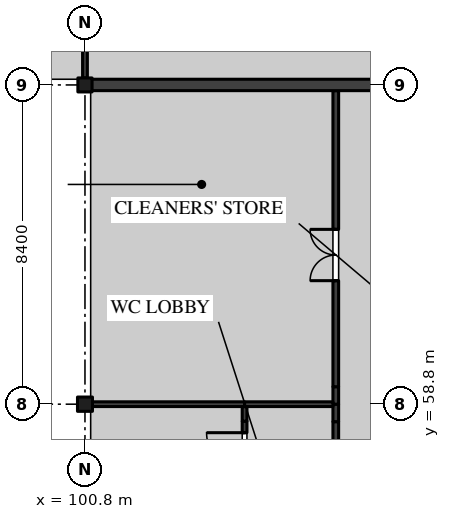
"""IFC4 building model, lengths in metres.
Left out: names, types, materials, properties, quantities, classifications, styles, units other than length and angle.
Written with IfcOpenShell. Run it as: python <this file> out.ifc"""

import sys

from ifc_helpers import new_model, si_unit, direction, frame, frame_2d, origin, origin_2d, place, context, subcontext, project, spatial, rectangle, i_section, extrude, element, fill, save


model = new_model("IFC4")
c1 = context("Model", 3, precision=1e-05, world=origin(), true_north=direction((0.0, 1.0)))
c2 = subcontext(c1, "Body", "Model", "MODEL_VIEW")
j1 = project(units=[si_unit("LENGTHUNIT", "METRE"), si_unit("PLANEANGLEUNIT", "RADIAN")], contexts=[c1])
p1 = place(None, origin())
s1 = spatial("IfcSite", under=j1, at=p1, CompositionType="ELEMENT")
p2 = place(p1, origin())
s2 = spatial("IfcBuilding", under=s1, at=p2, CompositionType="ELEMENT")
p3 = place(p2, frame((0.0, 0.0, 18.9)))
s3 = spatial("IfcBuildingStorey", under=s2, at=p3, CompositionType="ELEMENT", Elevation=18.9)
p4 = place(p3, frame((100.8, 58.8, 0.0), z_axis=(0.0, 0.0, 1.0), x_axis=(1.0, 0.0, 0.0)))
e1 = element("IfcColumn", 1, at=p4, inside=s3, PredefinedType="COLUMN", context=c2, shape_type="SweptSolid", body=[
    extrude(i_section(OverallWidth=0.394, OverallDepth=0.376, WebThickness=0.017, FlangeThickness=0.028, FilletRadius=0.015, at=origin_2d()), origin(), (0.0, 0.0, 1.0), 4.37),
])
p5 = place(p3, frame((100.8, 67.2, 0.0), z_axis=(0.0, 0.0, 1.0), x_axis=(1.0, 0.0, 0.0)))
e2 = element("IfcColumn", 2, at=p5, inside=s3, PredefinedType="COLUMN", context=c2, shape_type="SweptSolid", body=[
    extrude(i_section(OverallWidth=0.373, OverallDepth=0.368, WebThickness=0.015, FlangeThickness=0.024, FilletRadius=0.015, at=origin_2d()), origin(), (0.0, 0.0, 1.0), 4.37),
])
p6 = place(p3, frame((107.4, 50.86, 0.0), z_axis=(0.0, 0.0, 1.0), x_axis=(0.0, 1.0, 0.0)))
e3 = element("IfcWall", 3, at=p6, inside=s3, PredefinedType="PARTITIONING", context=c2, shape_type="SweptSolid", body=[
    extrude(rectangle(XDim=7.48, YDim=0.15, at=frame_2d((3.74, 0.0))), origin(), (0.0, 0.0, 1.0), 4.37),
])
p7 = place(p6, frame((2.09, 0.0, 0.0)))
e4 = element("IfcOpeningElement", 4, at=p7, cuts=e3, PredefinedType="OPENING", context=c2, shape_type="SweptSolid", body=[
    extrude(rectangle(XDim=0.9, YDim=2.1, at=frame_2d((0.45, 1.05))), frame((0.0, 0.085, 0.0), z_axis=(0.0, -1.0, 0.0), x_axis=(1.0, 0.0, 0.0)), (0.0, 0.0, 1.0), 0.17),
])
for number, where, z_axis, x_axis in (
    (5, (107.4, 58.34, 0.0), (0.0, 0.0, 1.0), (0.0, 1.0, 0.0)),
    (6, (107.4, 58.8, 0.0), (0.0, 0.0, 1.0), (0.0, 1.0, 0.0)),
):
    element("IfcWall", number, at=place(p3, frame(where, z_axis=z_axis, x_axis=x_axis)), inside=s3, PredefinedType="PARTITIONING", context=c2, shape_type="SweptSolid", body=[
        extrude(rectangle(XDim=0.46, YDim=0.15, at=frame_2d((0.23, 0.0))), origin(), (0.0, 0.0, 1.0), 3.746),
    ])
p8 = place(p3, frame((107.4, 59.26, 0.0), z_axis=(0.0, 0.0, 1.0), x_axis=(0.0, 1.0, 0.0)))
e7 = element("IfcWall", 7, at=p8, inside=s3, PredefinedType="PARTITIONING", context=c2, shape_type="SweptSolid", body=[
    extrude(rectangle(XDim=7.79, YDim=0.15, at=frame_2d((3.895, 0.0))), origin(), (0.0, 0.0, 1.0), 4.37),
])
p9 = place(p8, frame((2.79, 0.0, 0.0)))
e8 = element("IfcOpeningElement", 8, at=p9, cuts=e7, PredefinedType="OPENING", context=c2, shape_type="SweptSolid", body=[
    extrude(rectangle(XDim=1.35, YDim=2.1, at=frame_2d((0.675, 1.05))), frame((0.0, 0.085, 0.0), z_axis=(0.0, -1.0, 0.0), x_axis=(1.0, 0.0, 0.0)), (0.0, 0.0, 1.0), 0.17),
])
p10 = place(p3, frame((105.0, 56.4, 0.0), z_axis=(0.0, 0.0, 1.0), x_axis=(0.0, 1.0, 0.0)))
e9 = element("IfcWall", 9, at=p10, inside=s3, PredefinedType="PARTITIONING", context=c2, shape_type="SweptSolid", body=[
    extrude(rectangle(XDim=1.952, YDim=0.125, at=frame_2d((0.976, 0.0))), origin(), (0.0, 0.0, 1.0), 4.37),
])
p11 = place(p10, frame((0.65, 0.0, 0.0)))
e10 = element("IfcOpeningElement", 10, at=p11, cuts=e9, PredefinedType="OPENING", context=c2, shape_type="SweptSolid", body=[
    extrude(rectangle(XDim=1.0, YDim=2.1, at=frame_2d((0.5, 1.05))), frame((0.0, 0.073, 0.0), z_axis=(0.0, -1.0, 0.0), x_axis=(1.0, 0.0, 0.0)), (0.0, 0.0, 1.0), 0.145),
])
p12 = place(p3, frame((105.0, 58.352, 0.0), z_axis=(0.0, 0.0, 1.0), x_axis=(0.0, 1.0, 0.0)))
e11 = element("IfcWall", 11, at=p12, inside=s3, PredefinedType="PARTITIONING", context=c2, shape_type="SweptSolid", body=[
    extrude(rectangle(XDim=0.385, YDim=0.125, at=frame_2d((0.192, 0.0))), origin(), (0.0, 0.0, 1.0), 3.746),
])
p13 = place(p3, frame((100.997, 58.8, 0.0), z_axis=(0.0, 0.0, 1.0), x_axis=(1.0, 0.0, 0.0)))
e12 = element("IfcWall", 12, at=p13, inside=s3, PredefinedType="PARTITIONING", context=c2, shape_type="SweptSolid", body=[
    extrude(rectangle(XDim=4.003, YDim=0.125, at=frame_2d((2.001, 0.0))), origin(), (0.0, 0.0, 1.0), 3.746),
])
p14 = place(p3, frame((105.0, 58.8, 0.0), z_axis=(0.0, 0.0, 1.0), x_axis=(1.0, 0.0, 0.0)))
e13 = element("IfcWall", 13, at=p14, inside=s3, PredefinedType="PARTITIONING", context=c2, shape_type="SweptSolid", body=[
    extrude(rectangle(XDim=2.325, YDim=0.125, at=frame_2d((1.163, 0.0))), origin(), (0.0, 0.0, 1.0), 3.746),
])
p15 = place(p3, frame((100.8, 67.384, 0.0), z_axis=(0.0, 0.0, 1.0), x_axis=(0.0, 1.0, 0.0)))
e14 = element("IfcWall", 14, at=p15, inside=s3, PredefinedType="PARTITIONING", context=c2, shape_type="SweptSolid", body=[
    extrude(rectangle(XDim=6.641, YDim=0.125, at=frame_2d((3.32, 0.0))), origin(), (0.0, 0.0, 1.0), 3.819),
])
p16 = place(p3, frame((109.0, 67.2, 0.0), z_axis=(0.0, 0.0, 1.0), x_axis=(-1.0, 0.0, 0.0)))
e15 = element("IfcWall", 15, at=p16, inside=s3, PredefinedType="SOLIDWALL", context=c2, shape_type="SweptSolid", body=[
    extrude(rectangle(XDim=8.197, YDim=0.3, at=frame_2d((4.099, 0.0))), origin(), (0.0, 0.0, 1.0), 3.746),
])
p17 = place(p11, origin())
e16 = element("IfcDoor", 16, at=p17, inside=s3, OperationType="SINGLE_SWING_LEFT", PredefinedType="DOOR", context=c2, shape_type="SweptSolid", body=[
    extrude(rectangle(XDim=1.0, YDim=2.1, at=frame_2d((0.5, 1.05))), frame((0.0, 0.02, 0.0), z_axis=(0.0, -1.0, 0.0), x_axis=(1.0, 0.0, 0.0)), (0.0, 0.0, 1.0), 0.04),
])
fill(e10, e16)
p18 = place(p9, origin())
e17 = element("IfcDoor", 17, at=p18, inside=s3, OperationType="DOUBLE_DOOR_SINGLE_SWING", PredefinedType="DOOR", context=c2, shape_type="SweptSolid", body=[
    extrude(rectangle(XDim=1.35, YDim=2.1, at=frame_2d((0.675, 1.05))), frame((0.0, 0.025, 0.0), z_axis=(0.0, -1.0, 0.0), x_axis=(1.0, 0.0, 0.0)), (0.0, 0.0, 1.0), 0.05),
])
fill(e8, e17)
save(model, sys.argv[1])
